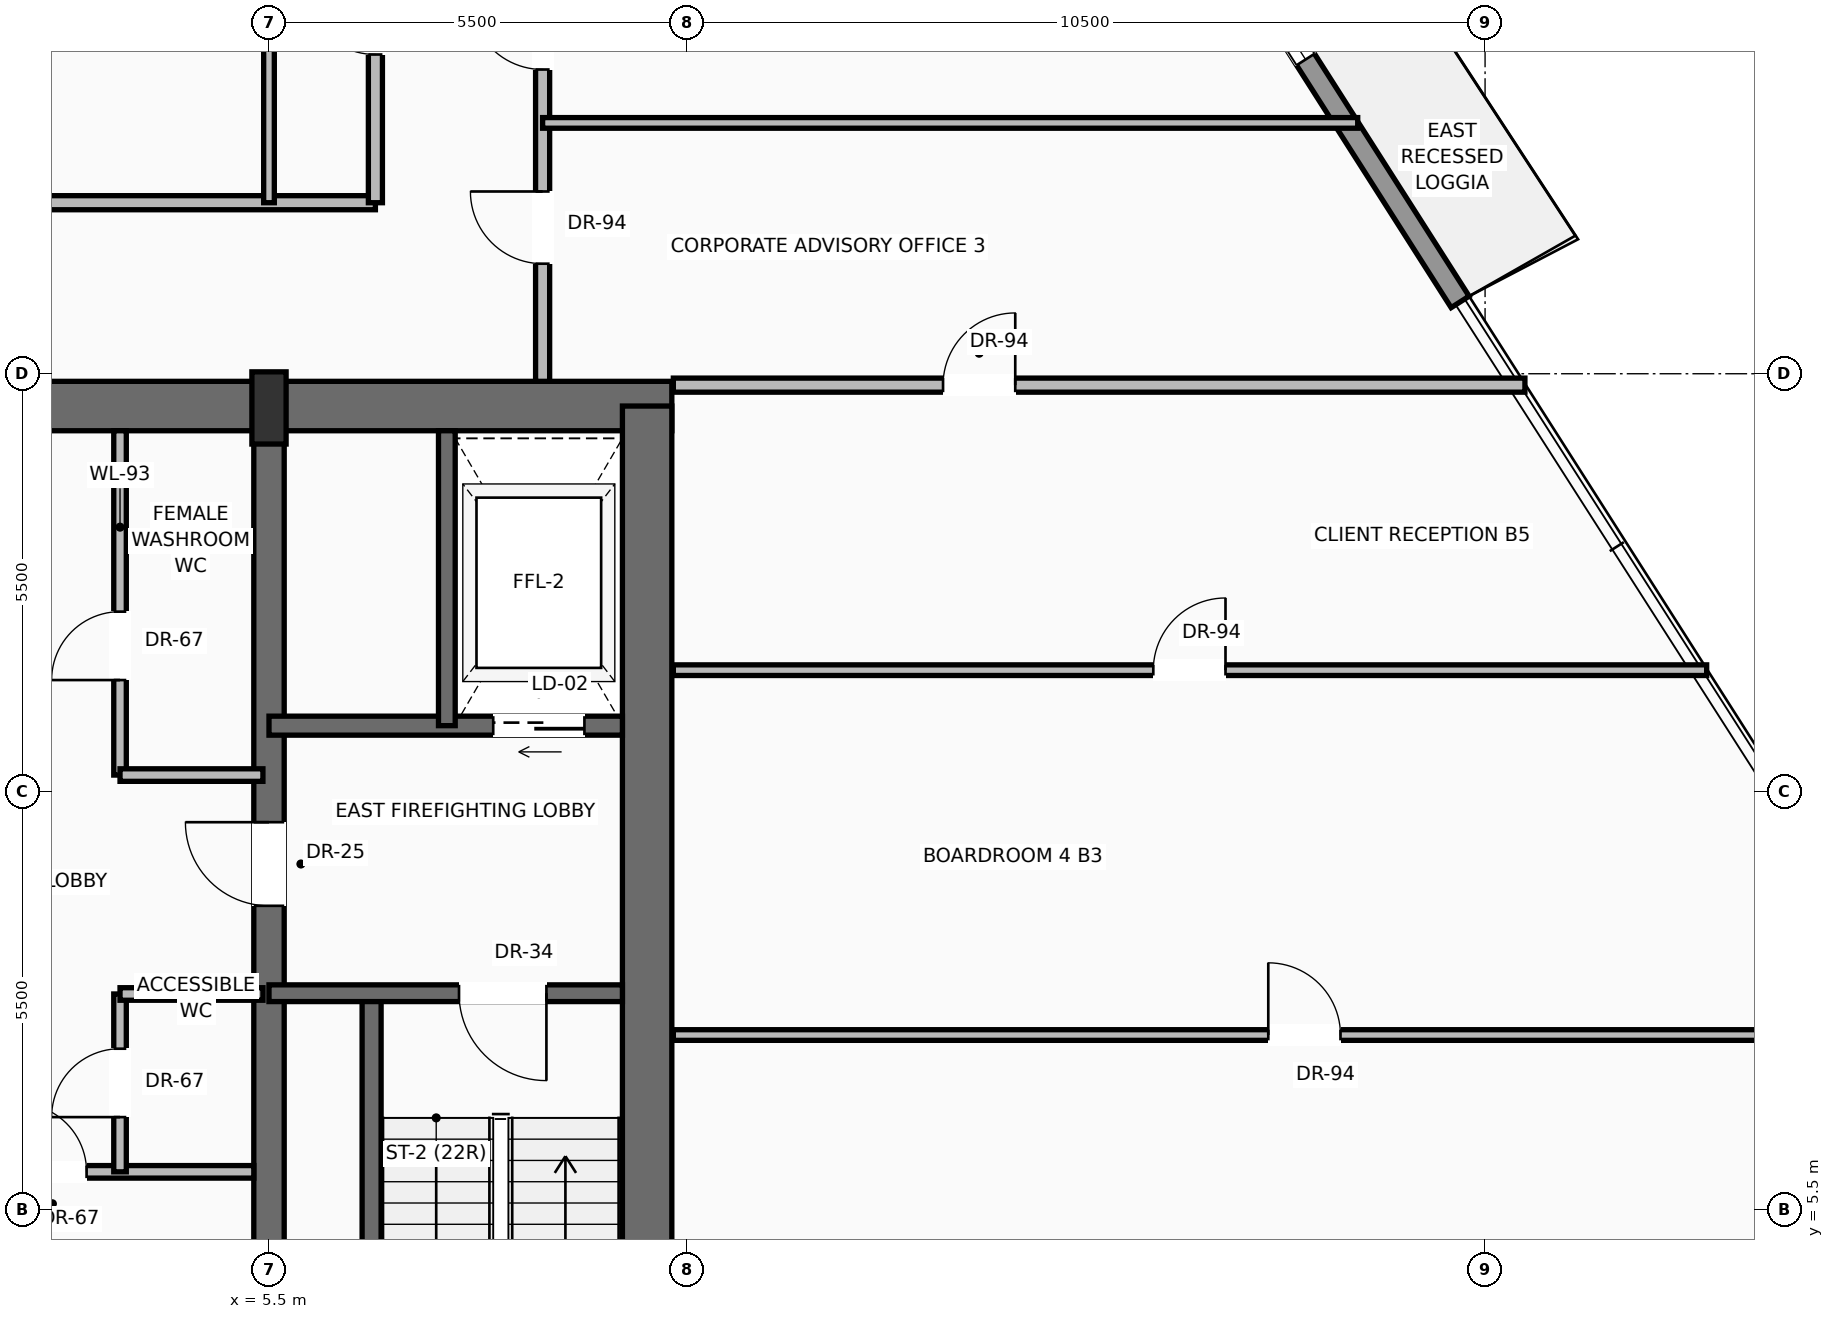
"""IFC4 building model, lengths in metres.
Left out: names, types, materials, properties, quantities, classifications, styles, units other than length and angle.
Written with IfcOpenShell. Run it as: python <this file> out.ifc"""

import sys

from ifc_helpers import new_model, si_unit, direction, frame, frame_2d, origin, origin_2d, place, context, subcontext, project, spatial, rectangle, extrude, source, transform, mapped, element, fill, save


model = new_model("IFC4")
c1 = context("Model", 3, precision=1e-05, world=origin(), true_north=direction((0.0, 1.0)))
c2 = subcontext(c1, "Body", "Model", "MODEL_VIEW")
j1 = project(units=[si_unit("LENGTHUNIT", "METRE"), si_unit("PLANEANGLEUNIT", "RADIAN")], contexts=[c1])
p1 = place(None, origin())
s1 = spatial("IfcSite", under=j1, at=p1, CompositionType="ELEMENT")
p2 = place(p1, origin())
s2 = spatial("IfcBuilding", under=s1, at=p2, CompositionType="ELEMENT")
p3 = place(p2, frame((0.0, 0.0, 136.7)))
s3 = spatial("IfcBuildingStorey", under=s2, at=p3, CompositionType="ELEMENT", Elevation=136.7)
p4 = place(p3, frame((-10.8, 16.075, 0.0), z_axis=(0.0, 0.0, 1.0), x_axis=(1.0, 0.0, 0.0)))
e1 = element("IfcWall", 1, at=p4, inside=s3, PredefinedType="SHEAR", context=c2, shape_type="SweptSolid", body=[
    extrude(rectangle(XDim=21.6, YDim=0.65, at=frame_2d((10.8, 0.0))), origin(), (0.0, 0.0, 1.0), 3.47),
])
p5 = place(p4, frame((3.37, 0.0, 0.0)))
e2 = element("IfcOpeningElement", 2, at=p5, cuts=e1, PredefinedType="OPENING", context=c2, shape_type="SweptSolid", body=[
    extrude(rectangle(XDim=1.3, YDim=2.3, at=frame_2d((0.65, 1.15))), frame((0.0, 0.335, 0.0), z_axis=(0.0, -1.0, 0.0), x_axis=(1.0, 0.0, 0.0)), (0.0, 0.0, 1.0), 0.67),
])
p6 = place(p4, frame((9.8, 0.0, 0.0)))
e3 = element("IfcOpeningElement", 3, at=p6, cuts=e1, PredefinedType="OPENING", context=c2, shape_type="SweptSolid", body=[
    extrude(rectangle(XDim=2.0, YDim=2.4, at=frame_2d((1.0, 1.2))), frame((0.0, 0.335, 0.0), z_axis=(0.0, -1.0, 0.0), x_axis=(1.0, 0.0, 0.0)), (0.0, 0.0, 1.0), 0.67),
])
p7 = place(p3, frame((10.475, 0.525, 0.0), z_axis=(0.0, 0.0, 1.0), x_axis=(0.0, 1.0, 0.0)))
e4 = element("IfcWall", 4, at=p7, inside=s3, PredefinedType="SHEAR", context=c2, shape_type="SweptSolid", body=[
    extrude(rectangle(XDim=15.55, YDim=0.65, at=frame_2d((7.775, 0.0))), origin(), (0.0, 0.0, 1.0), 3.47),
])
p8 = place(p3, frame((5.5, 0.525, 0.0), z_axis=(0.0, 0.0, 1.0), x_axis=(0.0, 1.0, 0.0)))
e5 = element("IfcWall", 5, at=p8, inside=s3, PredefinedType="SHEAR", context=c2, shape_type="SweptSolid", body=[
    extrude(rectangle(XDim=15.55, YDim=0.4, at=frame_2d((7.775, 0.0))), origin(), (0.0, 0.0, 1.0), 3.47),
])
p9 = place(p8, frame((8.975, 0.0, 0.0)))
e6 = element("IfcOpeningElement", 6, at=p9, cuts=e5, PredefinedType="OPENING", context=c2, shape_type="SweptSolid", body=[
    extrude(rectangle(XDim=1.1, YDim=2.2, at=frame_2d((0.55, 1.1))), frame((0.0, 0.21, 0.0), z_axis=(0.0, -1.0, 0.0), x_axis=(1.0, 0.0, 0.0)), (0.0, 0.0, 1.0), 0.42),
])
m1 = source(origin(), c2, "Body", "SweptSolid", [
    extrude(rectangle(XDim=0.45, YDim=0.95, at=origin_2d()), origin(), (0.0, 0.0, 1.0), 3.7),
])
p10 = place(p3, frame((5.5, 16.05, 0.0), z_axis=(0.0, 0.0, 1.0), x_axis=(1.0, 0.0, 0.0)))
e7 = element("IfcColumn", 7, at=p10, inside=s3, PredefinedType="PILASTER", context=c2, shape_type="MappedRepresentation", body=[
    mapped(m1, transform((0.0, 0.0, 0.0), scale=1.0)),
])
p11 = place(p3, frame((11.456, 32.681, 0.0), z_axis=(0.0, 0.0, 1.0), x_axis=(0.537658563867, -0.843162658507, 0.0)))
e8 = element("IfcWall", 8, at=p11, inside=s3, PredefinedType="SOLIDWALL", context=c2, shape_type="SweptSolid", body=[
    extrude(rectangle(XDim=18.07, YDim=0.28, at=frame_2d((9.035, 0.0))), origin(), (0.0, 0.0, 1.0), 3.05),
])
p12 = place(p11, frame((4.337, 0.0, 0.0)))
e9 = element("IfcOpeningElement", 9, at=p12, cuts=e8, PredefinedType="OPENING", context=c2, shape_type="SweptSolid", body=[
    extrude(rectangle(XDim=1.6, YDim=2.35, at=frame_2d((0.8, 1.175))), frame((0.0, 0.15, 0.0), z_axis=(0.0, -1.0, 0.0), x_axis=(1.0, 0.0, 0.0)), (0.0, 0.0, 1.0), 0.3),
])
p13 = place(p11, frame((12.288, 0.0, 0.9)))
e10 = element("IfcOpeningElement", 10, at=p13, cuts=e8, PredefinedType="OPENING", context=c2, shape_type="SweptSolid", body=[
    extrude(rectangle(XDim=2.0, YDim=1.85, at=frame_2d((1.0, 0.925))), frame((0.0, 0.15, 0.0), z_axis=(0.0, -1.0, 0.0), x_axis=(1.0, 0.0, 0.0)), (0.0, 0.0, 1.0), 0.3),
])
p14 = place(p3, frame((6.85, 0.85, 0.0), z_axis=(0.0, 0.0, 1.0), x_axis=(0.0, 1.0, 0.0)))
e11 = element("IfcWall", 11, at=p14, inside=s3, PredefinedType="SOLIDWALL", context=c2, shape_type="SweptSolid", body=[
    extrude(rectangle(XDim=7.5, YDim=0.25, at=frame_2d((3.75, 0.0))), origin(), (0.0, 0.0, 1.0), 3.47),
])
p15 = place(p3, frame((10.15, 8.35, 0.0), z_axis=(0.0, 0.0, 1.0), x_axis=(-1.0, 0.0, 0.0)))
e12 = element("IfcWall", 12, at=p15, inside=s3, PredefinedType="SOLIDWALL", context=c2, shape_type="SweptSolid", body=[
    extrude(rectangle(XDim=4.65, YDim=0.22, at=frame_2d((2.325, 0.0))), origin(), (0.0, 0.0, 1.0), 3.47),
])
p16 = place(p15, frame((1.0, 0.0, 0.0)))
e13 = element("IfcOpeningElement", 13, at=p16, cuts=e12, PredefinedType="OPENING", context=c2, shape_type="SweptSolid", body=[
    extrude(rectangle(XDim=1.15, YDim=2.2, at=frame_2d((0.575, 1.1))), frame((0.0, 0.12, 0.0), z_axis=(0.0, -1.0, 0.0), x_axis=(1.0, 0.0, 0.0)), (0.0, 0.0, 1.0), 0.24),
])
p17 = place(p3, frame((10.15, 11.87, 0.0), z_axis=(0.0, 0.0, 1.0), x_axis=(-1.0, 0.0, 0.0)))
e14 = element("IfcWall", 14, at=p17, inside=s3, PredefinedType="SOLIDWALL", context=c2, shape_type="SweptSolid", body=[
    extrude(rectangle(XDim=4.65, YDim=0.25, at=frame_2d((2.325, 0.0))), origin(), (0.0, 0.0, 1.0), 3.47),
])
p18 = place(p17, frame((0.5, 0.0, 0.0)))
e15 = element("IfcOpeningElement", 15, at=p18, cuts=e14, PredefinedType="OPENING", context=c2, shape_type="SweptSolid", body=[
    extrude(rectangle(XDim=1.2, YDim=2.25, at=frame_2d((0.6, 1.125))), frame((0.0, 0.135, 0.0), z_axis=(0.0, -1.0, 0.0), x_axis=(1.0, 0.0, 0.0)), (0.0, 0.0, 1.0), 0.27),
])
p19 = place(p3, frame((7.84, 11.87, 0.0), z_axis=(0.0, 0.0, 1.0), x_axis=(0.0, 1.0, 0.0)))
e16 = element("IfcWall", 16, at=p19, inside=s3, PredefinedType="SOLIDWALL", context=c2, shape_type="SweptSolid", body=[
    extrude(rectangle(XDim=3.88, YDim=0.22, at=frame_2d((1.94, 0.0))), origin(), (0.0, 0.0, 1.0), 3.47),
])
p20 = place(p3, frame((1.82, 6.0, 0.0), z_axis=(0.0, 0.0, 1.0), x_axis=(1.0, 0.0, 0.0)))
e17 = element("IfcWall", 17, at=p20, inside=s3, PredefinedType="PARTITIONING", context=c2, shape_type="SweptSolid", body=[
    extrude(rectangle(XDim=3.48, YDim=0.165, at=frame_2d((1.74, 0.0))), origin(), (0.0, 0.0, 1.0), 3.462),
])
p21 = place(p20, frame((0.38, 0.0, 0.0)))
e18 = element("IfcOpeningElement", 18, at=p21, cuts=e17, PredefinedType="OPENING", context=c2, shape_type="SweptSolid", body=[
    extrude(rectangle(XDim=0.9, YDim=2.1, at=frame_2d((0.45, 1.05))), frame((0.0, 0.093, 0.0), z_axis=(0.0, -1.0, 0.0), x_axis=(1.0, 0.0, 0.0)), (0.0, 0.0, 1.0), 0.185),
])
p22 = place(p3, frame((3.54, 6.0, 0.0), z_axis=(0.0, 0.0, 1.0), x_axis=(0.0, 1.0, 0.0)))
e19 = element("IfcWall", 19, at=p22, inside=s3, PredefinedType="PARTITIONING", context=c2, shape_type="SweptSolid", body=[
    extrude(rectangle(XDim=2.34, YDim=0.165, at=frame_2d((1.17, 0.0))), origin(), (0.0, 0.0, 1.0), 3.462),
])
p23 = place(p22, frame((0.72, 0.0, 0.0)))
e20 = element("IfcOpeningElement", 20, at=p23, cuts=e19, PredefinedType="OPENING", context=c2, shape_type="SweptSolid", body=[
    extrude(rectangle(XDim=0.9, YDim=2.1, at=frame_2d((0.45, 1.05))), frame((0.0, 0.093, 0.0), z_axis=(0.0, -1.0, 0.0), x_axis=(1.0, 0.0, 0.0)), (0.0, 0.0, 1.0), 0.185),
])
p24 = place(p3, frame((3.54, 8.34, 0.0), z_axis=(0.0, 0.0, 1.0), x_axis=(1.0, 0.0, 0.0)))
e21 = element("IfcWall", 21, at=p24, inside=s3, PredefinedType="PARTITIONING", context=c2, shape_type="SweptSolid", body=[
    extrude(rectangle(XDim=1.88, YDim=0.165, at=frame_2d((0.94, 0.0))), origin(), (0.0, 0.0, 1.0), 3.462),
])
p25 = place(p3, frame((3.54, 11.22, 0.0), z_axis=(0.0, 0.0, 1.0), x_axis=(0.0, 1.0, 0.0)))
e22 = element("IfcWall", 22, at=p25, inside=s3, PredefinedType="PARTITIONING", context=c2, shape_type="SweptSolid", body=[
    extrude(rectangle(XDim=4.53, YDim=0.165, at=frame_2d((2.265, 0.0))), origin(), (0.0, 0.0, 1.0), 3.462),
])
p26 = place(p25, frame((1.25, 0.0, 0.0)))
e23 = element("IfcOpeningElement", 23, at=p26, cuts=e22, PredefinedType="OPENING", context=c2, shape_type="SweptSolid", body=[
    extrude(rectangle(XDim=0.9, YDim=2.1, at=frame_2d((0.45, 1.05))), frame((0.0, 0.093, 0.0), z_axis=(0.0, -1.0, 0.0), x_axis=(1.0, 0.0, 0.0)), (0.0, 0.0, 1.0), 0.185),
])
p27 = place(p3, frame((3.54, 11.22, 0.0), z_axis=(0.0, 0.0, 1.0), x_axis=(1.0, 0.0, 0.0)))
e24 = element("IfcWall", 24, at=p27, inside=s3, PredefinedType="PARTITIONING", context=c2, shape_type="SweptSolid", body=[
    extrude(rectangle(XDim=1.88, YDim=0.165, at=frame_2d((0.94, 0.0))), origin(), (0.0, 0.0, 1.0), 3.462),
])
p28 = place(p3, frame((-7.2, 18.75, 0.0), z_axis=(0.0, 0.0, 1.0), x_axis=(1.0, 0.0, 0.0)))
e25 = element("IfcWall", 25, at=p28, inside=s3, PredefinedType="PARTITIONING", context=c2, shape_type="SweptSolid", body=[
    extrude(rectangle(XDim=14.1, YDim=0.185, at=frame_2d((7.05, 0.0))), origin(), (0.0, 0.0, 1.0), 2.846),
])
p29 = place(p28, frame((6.575, 0.0, 0.0)))
e26 = element("IfcOpeningElement", 26, at=p29, cuts=e25, PredefinedType="OPENING", context=c2, shape_type="SweptSolid", body=[
    extrude(rectangle(XDim=0.95, YDim=2.2, at=frame_2d((0.475, 1.1))), frame((0.0, 0.103, 0.0), z_axis=(0.0, -1.0, 0.0), x_axis=(1.0, 0.0, 0.0)), (0.0, 0.0, 1.0), 0.205),
])
p30 = place(p3, frame((6.9, 18.75, 0.0), z_axis=(0.0, 0.0, 1.0), x_axis=(0.0, 1.0, 0.0)))
e27 = element("IfcWall", 27, at=p30, inside=s3, PredefinedType="PARTITIONING", context=c2, shape_type="SweptSolid", body=[
    extrude(rectangle(XDim=4.85, YDim=0.185, at=frame_2d((2.425, 0.0))), origin(), (0.0, 0.0, 1.0), 3.462),
])
p31 = place(p30, frame((1.95, 0.0, 0.0)))
e28 = element("IfcOpeningElement", 28, at=p31, cuts=e27, PredefinedType="OPENING", context=c2, shape_type="SweptSolid", body=[
    extrude(rectangle(XDim=0.95, YDim=2.2, at=frame_2d((0.475, 1.1))), frame((0.0, 0.103, 0.0), z_axis=(0.0, -1.0, 0.0), x_axis=(1.0, 0.0, 0.0)), (0.0, 0.0, 1.0), 0.205),
])
p32 = place(p3, frame((9.1, 16.4, 0.0), z_axis=(0.0, 0.0, 1.0), x_axis=(0.0, 1.0, 0.0)))
e29 = element("IfcWall", 29, at=p32, inside=s3, PredefinedType="PARTITIONING", context=c2, shape_type="SweptSolid", body=[
    extrude(rectangle(XDim=7.2, YDim=0.185, at=frame_2d((3.6, 0.0))), origin(), (0.0, 0.0, 1.0), 3.462),
])
p33 = place(p32, frame((4.103, 0.0, 0.0)))
e30 = element("IfcOpeningElement", 30, at=p33, cuts=e29, PredefinedType="OPENING", context=c2, shape_type="SweptSolid", body=[
    extrude(rectangle(XDim=0.95, YDim=2.2, at=frame_2d((0.475, 1.1))), frame((0.0, 0.103, 0.0), z_axis=(0.0, -1.0, 0.0), x_axis=(1.0, 0.0, 0.0)), (0.0, 0.0, 1.0), 0.205),
])
p34 = place(p32, frame((1.548, 0.0, 0.0)))
e31 = element("IfcOpeningElement", 31, at=p34, cuts=e29, PredefinedType="OPENING", context=c2, shape_type="SweptSolid", body=[
    extrude(rectangle(XDim=0.95, YDim=2.2, at=frame_2d((0.475, 1.1))), frame((0.0, 0.103, 0.0), z_axis=(0.0, -1.0, 0.0), x_axis=(1.0, 0.0, 0.0)), (0.0, 0.0, 1.0), 0.205),
])
p35 = place(p3, frame((10.82, 16.35, 0.0), z_axis=(0.0, 0.0, 1.0), x_axis=(1.0, 0.0, 0.0)))
e32 = element("IfcWall", 32, at=p35, inside=s3, PredefinedType="PARTITIONING", context=c2, shape_type="SweptSolid", body=[
    extrude(rectangle(XDim=11.204, YDim=0.185, at=frame_2d((5.602, 0.0))), origin(), (0.0, 0.0, 1.0), 3.462),
])
p36 = place(p35, frame((3.549, 0.0, 0.0)))
e33 = element("IfcOpeningElement", 33, at=p36, cuts=e32, PredefinedType="OPENING", context=c2, shape_type="SweptSolid", body=[
    extrude(rectangle(XDim=0.95, YDim=2.2, at=frame_2d((0.475, 1.1))), frame((0.0, 0.103, 0.0), z_axis=(0.0, -1.0, 0.0), x_axis=(1.0, 0.0, 0.0)), (0.0, 0.0, 1.0), 0.205),
])
p37 = place(p3, frame((5.5, 18.75, 0.0), z_axis=(0.0, 0.0, 1.0), x_axis=(0.0, 1.0, 0.0)))
e34 = element("IfcWall", 34, at=p37, inside=s3, PredefinedType="PARTITIONING", context=c2, shape_type="SweptSolid", body=[
    extrude(rectangle(XDim=13.75, YDim=0.14, at=frame_2d((6.875, 0.0))), origin(), (0.0, 0.0, 1.0), 2.846),
])
p38 = place(p3, frame((10.82, 7.8, 0.0), z_axis=(0.0, 0.0, 1.0), x_axis=(1.0, 0.0, 0.0)))
e35 = element("IfcWall", 35, at=p38, inside=s3, PredefinedType="PARTITIONING", context=c2, shape_type="SweptSolid", body=[
    extrude(rectangle(XDim=16.625, YDim=0.14, at=frame_2d((8.312, 0.0))), origin(), (0.0, 0.0, 1.0), 3.462),
])
p39 = place(p38, frame((7.828, 0.0, 0.0)))
e36 = element("IfcOpeningElement", 36, at=p39, cuts=e35, PredefinedType="OPENING", context=c2, shape_type="SweptSolid", body=[
    extrude(rectangle(XDim=0.95, YDim=2.2, at=frame_2d((0.475, 1.1))), frame((0.0, 0.08, 0.0), z_axis=(0.0, -1.0, 0.0), x_axis=(1.0, 0.0, 0.0)), (0.0, 0.0, 1.0), 0.16),
])
p40 = place(p3, frame((10.82, 12.6, 0.0), z_axis=(0.0, 0.0, 1.0), x_axis=(1.0, 0.0, 0.0)))
e37 = element("IfcWall", 37, at=p40, inside=s3, PredefinedType="PARTITIONING", context=c2, shape_type="SweptSolid", body=[
    extrude(rectangle(XDim=13.595, YDim=0.14, at=frame_2d((6.798, 0.0))), origin(), (0.0, 0.0, 1.0), 3.462),
])
p41 = place(p40, frame((6.315, 0.0, 0.0)))
e38 = element("IfcOpeningElement", 38, at=p41, cuts=e37, PredefinedType="OPENING", context=c2, shape_type="SweptSolid", body=[
    extrude(rectangle(XDim=0.95, YDim=2.2, at=frame_2d((0.475, 1.1))), frame((0.0, 0.08, 0.0), z_axis=(0.0, -1.0, 0.0), x_axis=(1.0, 0.0, 0.0)), (0.0, 0.0, 1.0), 0.16),
])
p42 = place(p3, frame((9.1, 19.8, 0.0), z_axis=(0.0, 0.0, 1.0), x_axis=(1.0, 0.0, 0.0)))
e39 = element("IfcWall", 39, at=p42, inside=s3, PredefinedType="PARTITIONING", context=c2, shape_type="SweptSolid", body=[
    extrude(rectangle(XDim=10.724, YDim=0.14, at=frame_2d((5.362, 0.0))), origin(), (0.0, 0.0, 1.0), 3.462),
])
m2 = source(origin(), c2, "Body", "SweptSolid", [
    extrude(rectangle(XDim=2.0, YDim=1.85, at=frame_2d((1.0, 0.925))), frame((0.0, 0.03, 0.0), z_axis=(0.0, -1.0, 0.0), x_axis=(1.0, 0.0, 0.0)), (0.0, 0.0, 1.0), 0.06),
])
p43 = place(p13, origin())
e40 = element("IfcWindow", 40, at=p43, inside=s3, PartitioningType="SINGLE_PANEL", PredefinedType="WINDOW", context=c2, shape_type="MappedRepresentation", body=[
    mapped(m2, transform((0.0, 0.0, 0.0), scale=1.0)),
])
fill(e10, e40)
m3 = source(origin(), c2, "Body", "SweptSolid", [
    extrude(rectangle(XDim=1.15, YDim=2.2, at=frame_2d((0.575, 1.1))), frame((0.0, 0.025, 0.0), z_axis=(0.0, -1.0, 0.0), x_axis=(1.0, 0.0, 0.0)), (0.0, 0.0, 1.0), 0.05),
])
p44 = place(p16, origin())
e41 = element("IfcDoor", 41, at=p44, inside=s3, OperationType="SINGLE_SWING_LEFT", PredefinedType="DOOR", context=c2, shape_type="MappedRepresentation", body=[
    mapped(m3, transform((0.0, 0.0, 0.0), scale=1.0)),
])
fill(e13, e41)
m4 = source(origin(), c2, "Body", "SweptSolid", [
    extrude(rectangle(XDim=1.1, YDim=2.2, at=frame_2d((0.55, 1.1))), frame((0.0, 0.025, 0.0), z_axis=(0.0, -1.0, 0.0), x_axis=(1.0, 0.0, 0.0)), (0.0, 0.0, 1.0), 0.05),
])
p45 = place(p9, origin())
e42 = element("IfcDoor", 42, at=p45, inside=s3, OperationType="SINGLE_SWING_RIGHT", PredefinedType="DOOR", context=c2, shape_type="MappedRepresentation", body=[
    mapped(m4, transform((0.0, 0.0, 0.0), scale=1.0)),
])
fill(e6, e42)
m5 = source(origin(), c2, "Body", "SweptSolid", [
    extrude(rectangle(XDim=1.2, YDim=2.25, at=frame_2d((0.6, 1.125))), frame((0.0, 0.025, 0.0), z_axis=(0.0, -1.0, 0.0), x_axis=(1.0, 0.0, 0.0)), (0.0, 0.0, 1.0), 0.05),
])
p46 = place(p18, origin())
e43 = element("IfcDoor", 43, at=p46, inside=s3, OperationType="SLIDING_TO_RIGHT", PredefinedType="DOOR", context=c2, shape_type="MappedRepresentation", body=[
    mapped(m5, transform((0.0, 0.0, 0.0), scale=1.0)),
])
fill(e15, e43)
m6 = source(origin(), c2, "Body", "SweptSolid", [
    extrude(rectangle(XDim=0.9, YDim=2.1, at=frame_2d((0.45, 1.05))), frame((0.0, 0.025, 0.0), z_axis=(0.0, -1.0, 0.0), x_axis=(1.0, 0.0, 0.0)), (0.0, 0.0, 1.0), 0.05),
])
p47 = place(p21, origin())
e44 = element("IfcDoor", 44, at=p47, inside=s3, OperationType="SINGLE_SWING_LEFT", PredefinedType="DOOR", context=c2, shape_type="MappedRepresentation", body=[
    mapped(m6, transform((0.0, 0.0, 0.0), scale=1.0)),
])
fill(e18, e44)
p48 = place(p23, origin())
e45 = element("IfcDoor", 45, at=p48, inside=s3, OperationType="SINGLE_SWING_LEFT", PredefinedType="DOOR", context=c2, shape_type="MappedRepresentation", body=[
    mapped(m6, transform((0.0, 0.0, 0.0), scale=1.0)),
])
fill(e20, e45)
p49 = place(p26, origin())
e46 = element("IfcDoor", 46, at=p49, inside=s3, OperationType="SINGLE_SWING_LEFT", PredefinedType="DOOR", context=c2, shape_type="MappedRepresentation", body=[
    mapped(m6, transform((0.0, 0.0, 0.0), scale=1.0)),
])
fill(e23, e46)
m7 = source(origin(), c2, "Body", "SweptSolid", [
    extrude(rectangle(XDim=0.95, YDim=2.2, at=frame_2d((0.475, 1.1))), frame((0.0, 0.025, 0.0), z_axis=(0.0, -1.0, 0.0), x_axis=(1.0, 0.0, 0.0)), (0.0, 0.0, 1.0), 0.05),
])
p50 = place(p33, origin())
e47 = element("IfcDoor", 47, at=p50, inside=s3, OperationType="SINGLE_SWING_RIGHT", PredefinedType="DOOR", context=c2, shape_type="MappedRepresentation", body=[
    mapped(m7, transform((0.0, 0.0, 0.0), scale=1.0)),
])
fill(e30, e47)
p51 = place(p36, origin())
e48 = element("IfcDoor", 48, at=p51, inside=s3, OperationType="SINGLE_SWING_RIGHT", PredefinedType="DOOR", context=c2, shape_type="MappedRepresentation", body=[
    mapped(m7, transform((0.0, 0.0, 0.0), scale=1.0)),
])
fill(e33, e48)
p52 = place(p34, origin())
e49 = element("IfcDoor", 49, at=p52, inside=s3, OperationType="SINGLE_SWING_RIGHT", PredefinedType="DOOR", context=c2, shape_type="MappedRepresentation", body=[
    mapped(m7, transform((0.0, 0.0, 0.0), scale=1.0)),
])
fill(e31, e49)
p53 = place(p31, origin())
e50 = element("IfcDoor", 50, at=p53, inside=s3, OperationType="SINGLE_SWING_RIGHT", PredefinedType="DOOR", context=c2, shape_type="MappedRepresentation", body=[
    mapped(m7, transform((0.0, 0.0, 0.0), scale=1.0)),
])
fill(e28, e50)
p54 = place(p41, origin())
e51 = element("IfcDoor", 51, at=p54, inside=s3, OperationType="SINGLE_SWING_RIGHT", PredefinedType="DOOR", context=c2, shape_type="MappedRepresentation", body=[
    mapped(m7, transform((0.0, 0.0, 0.0), scale=1.0)),
])
fill(e38, e51)
p55 = place(p39, origin())
e52 = element("IfcDoor", 52, at=p55, inside=s3, OperationType="SINGLE_SWING_LEFT", PredefinedType="DOOR", context=c2, shape_type="MappedRepresentation", body=[
    mapped(m7, transform((0.0, 0.0, 0.0), scale=1.0)),
])
fill(e36, e52)
save(model, sys.argv[1])
